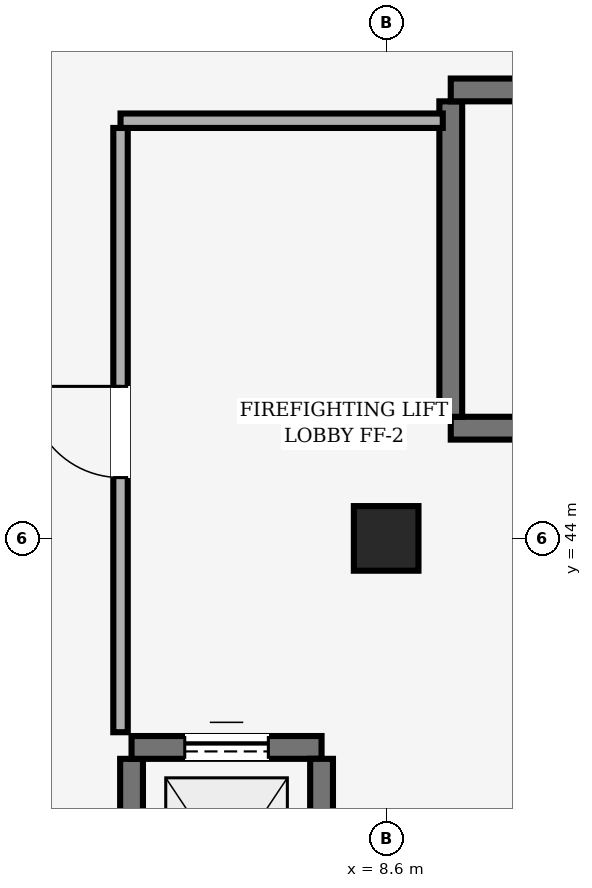
"""IFC4 building model, lengths in metres.
Left out: names, types, materials, properties, quantities, classifications, styles, units other than length and angle.
Written with IfcOpenShell. Run it as: python <this file> out.ifc"""

import sys

from ifc_helpers import new_model, si_unit, direction, frame, frame_2d, origin, origin_2d, place, context, subcontext, project, spatial, rectangle, extrude, element, fill, save


model = new_model("IFC4")
c1 = context("Model", 3, precision=1e-05, world=origin(), true_north=direction((0.0, 1.0)))
c2 = subcontext(c1, "Body", "Model", "MODEL_VIEW")
j1 = project(units=[si_unit("LENGTHUNIT", "METRE"), si_unit("PLANEANGLEUNIT", "RADIAN")], contexts=[c1])
p1 = place(None, origin())
s1 = spatial("IfcSite", under=j1, at=p1, CompositionType="ELEMENT")
p2 = place(p1, origin())
s2 = spatial("IfcBuilding", under=s1, at=p2, CompositionType="ELEMENT")
p3 = place(p2, frame((0.0, 0.0, -4.2)))
s3 = spatial("IfcBuildingStorey", under=s2, at=p3, CompositionType="ELEMENT", Elevation=-4.2)
p4 = place(p3, frame((8.6, 44.0, 0.0), z_axis=(0.0, 0.0, 1.0), x_axis=(1.0, 0.0, 0.0)))
e1 = element("IfcColumn", 1, at=p4, inside=s3, PredefinedType="COLUMN", context=c2, shape_type="SweptSolid", body=[
    extrude(rectangle(XDim=0.85, YDim=0.85, at=origin_2d()), origin(), (0.0, 0.0, 1.0), 3.92),
])
p5 = place(p3, frame((19.63, 45.45, 0.0), z_axis=(0.0, 0.0, 1.0), x_axis=(-1.0, 0.0, 0.0)))
e2 = element("IfcWall", 2, at=p5, inside=s3, PredefinedType="SHEAR", context=c2, shape_type="SweptSolid", body=[
    extrude(rectangle(XDim=10.18, YDim=0.3, at=frame_2d((5.09, 0.0))), origin(), (0.0, 0.0, 1.0), 3.92),
])
p6 = place(p3, frame((9.45, 45.6, 0.0), z_axis=(0.0, 0.0, 1.0), x_axis=(0.0, 1.0, 0.0)))
e3 = element("IfcWall", 3, at=p6, inside=s3, PredefinedType="SHEAR", context=c2, shape_type="SweptSolid", body=[
    extrude(rectangle(XDim=4.15, YDim=0.3, at=frame_2d((2.075, 0.0))), origin(), (0.0, 0.0, 1.0), 3.92),
])
p7 = place(p3, frame((9.45, 49.9, 0.0), z_axis=(0.0, 0.0, 1.0), x_axis=(1.0, 0.0, 0.0)))
e4 = element("IfcWall", 4, at=p7, inside=s3, PredefinedType="SHEAR", context=c2, shape_type="SweptSolid", body=[
    extrude(rectangle(XDim=10.18, YDim=0.3, at=frame_2d((5.09, 0.0))), origin(), (0.0, 0.0, 1.0), 3.92),
])
p8 = place(p3, frame((5.25, 38.2, 0.0), z_axis=(0.0, 0.0, 1.0), x_axis=(0.0, 1.0, 0.0)))
e5 = element("IfcWall", 5, at=p8, inside=s3, PredefinedType="SHEAR", context=c2, shape_type="SweptSolid", body=[
    extrude(rectangle(XDim=2.9, YDim=0.3, at=frame_2d((1.45, 0.0))), origin(), (0.0, 0.0, 1.0), 3.92),
])
p9 = place(p3, frame((5.25, 41.25, 0.0), z_axis=(0.0, 0.0, 1.0), x_axis=(1.0, 0.0, 0.0)))
e6 = element("IfcWall", 6, at=p9, inside=s3, PredefinedType="SHEAR", context=c2, shape_type="SweptSolid", body=[
    extrude(rectangle(XDim=2.5, YDim=0.3, at=frame_2d((1.25, 0.0))), origin(), (0.0, 0.0, 1.0), 3.92),
])
p10 = place(p9, frame((0.7, 0.0, 0.0)))
e7 = element("IfcOpeningElement", 7, at=p10, cuts=e6, PredefinedType="OPENING", context=c2, shape_type="SweptSolid", body=[
    extrude(rectangle(XDim=1.1, YDim=2.1, at=frame_2d((0.55, 1.05))), frame((0.0, 0.15, 0.0), z_axis=(0.0, -1.0, 0.0), x_axis=(1.0, 0.0, 0.0)), (0.0, 0.0, 1.0), 0.3),
])
p11 = place(p3, frame((7.75, 41.1, 0.0), z_axis=(0.0, 0.0, 1.0), x_axis=(0.0, -1.0, 0.0)))
e8 = element("IfcWall", 8, at=p11, inside=s3, PredefinedType="SHEAR", context=c2, shape_type="SweptSolid", body=[
    extrude(rectangle(XDim=2.9, YDim=0.3, at=frame_2d((1.45, 0.0))), origin(), (0.0, 0.0, 1.0), 3.92),
])
p12 = place(p3, frame((5.105, 41.45, 0.0), z_axis=(0.0, 0.0, 1.0), x_axis=(0.0, 1.0, 0.0)))
e9 = element("IfcWall", 9, at=p12, inside=s3, PredefinedType="PARTITIONING", context=c2, shape_type="SweptSolid", body=[
    extrude(rectangle(XDim=7.95, YDim=0.19, at=frame_2d((3.975, 0.0))), origin(), (0.0, 0.0, 1.0), 3.9),
])
p13 = place(p12, frame((3.35, 0.0, 0.0)))
e10 = element("IfcOpeningElement", 10, at=p13, cuts=e9, PredefinedType="OPENING", context=c2, shape_type="SweptSolid", body=[
    extrude(rectangle(XDim=1.2, YDim=2.15, at=frame_2d((0.6, 1.075))), frame((0.0, 0.095, 0.0), z_axis=(0.0, -1.0, 0.0), x_axis=(1.0, 0.0, 0.0)), (0.0, 0.0, 1.0), 0.19),
])
p14 = place(p3, frame((5.105, 49.495, 0.0), z_axis=(0.0, 0.0, 1.0), x_axis=(1.0, 0.0, 0.0)))
e11 = element("IfcWall", 11, at=p14, inside=s3, PredefinedType="PARTITIONING", context=c2, shape_type="SweptSolid", body=[
    extrude(rectangle(XDim=4.24, YDim=0.19, at=frame_2d((2.12, 0.0))), origin(), (0.0, 0.0, 1.0), 3.9),
])
p15 = place(p10, origin())
e12 = element("IfcDoor", 12, at=p15, inside=s3, OperationType="SLIDING_TO_LEFT", PredefinedType="DOOR", context=c2, shape_type="SweptSolid", body=[
    extrude(rectangle(XDim=1.1, YDim=2.1, at=frame_2d((0.55, 1.05))), frame((0.0, 0.025, 0.0), z_axis=(0.0, -1.0, 0.0), x_axis=(1.0, 0.0, 0.0)), (0.0, 0.0, 1.0), 0.05),
])
fill(e7, e12)
p16 = place(p13, origin())
e13 = element("IfcDoor", 13, at=p16, inside=s3, OperationType="SINGLE_SWING_RIGHT", PredefinedType="DOOR", context=c2, shape_type="SweptSolid", body=[
    extrude(rectangle(XDim=1.2, YDim=2.15, at=frame_2d((0.6, 1.075))), frame((0.0, 0.025, 0.0), z_axis=(0.0, -1.0, 0.0), x_axis=(1.0, 0.0, 0.0)), (0.0, 0.0, 1.0), 0.05),
])
fill(e10, e13)
save(model, sys.argv[1])
